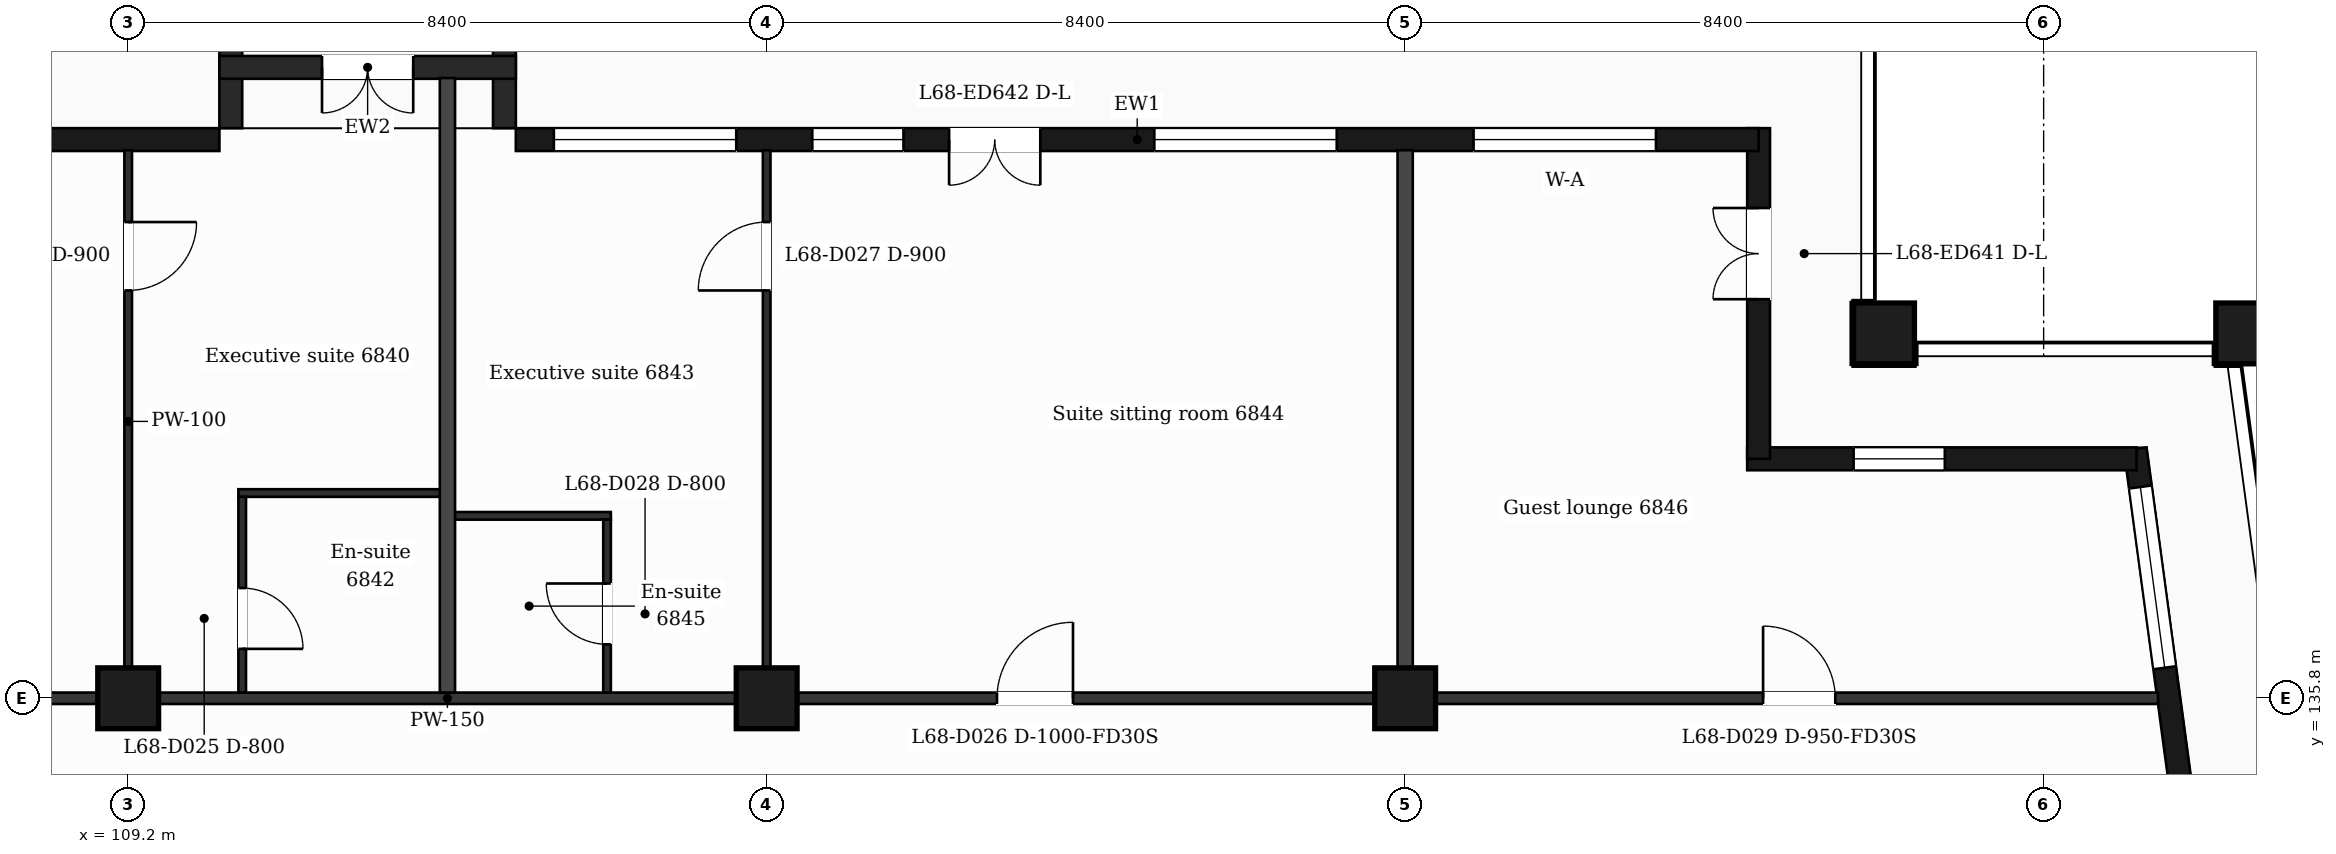
"""IFC4 building model, lengths in metres.
Left out: names, types, materials, properties, quantities, classifications, styles, units other than length and angle.
Written with IfcOpenShell. Run it as: python <this file> out.ifc"""

import sys

from ifc_helpers import new_model, si_unit, direction, frame, frame_2d, origin, origin_2d, place, context, subcontext, project, spatial, rectangle, extrude, element, fill, save


model = new_model("IFC4")
c1 = context("Model", 3, precision=1e-05, world=origin(), true_north=direction((0.0, 1.0)))
c2 = subcontext(c1, "Body", "Model", "MODEL_VIEW")
j1 = project(units=[si_unit("LENGTHUNIT", "METRE"), si_unit("PLANEANGLEUNIT", "RADIAN")], contexts=[c1])
p1 = place(None, origin())
s1 = spatial("IfcSite", under=j1, at=p1, CompositionType="ELEMENT")
p2 = place(p1, origin())
s2 = spatial("IfcBuilding", under=s1, at=p2, CompositionType="ELEMENT")
p3 = place(p2, frame((0.0, 0.0, 281.2)))
s3 = spatial("IfcBuildingStorey", under=s2, at=p3, CompositionType="ELEMENT", Elevation=281.2)
for number, where, z_axis, x_axis in (
    (1, (132.3, 140.6, 0.0), (0.0, 0.0, 1.0), (1.0, 0.0, 0.0)),
    (2, (137.065, 140.6, 0.0), (0.0, 0.0, 1.0), (1.0, 0.0, 0.0)),
    (3, (109.2, 135.8, 0.0), (0.0, 0.0, 1.0), (1.0, 0.0, 0.0)),
    (4, (117.6, 135.8, 0.0), (0.0, 0.0, 1.0), (1.0, 0.0, 0.0)),
    (5, (126.0, 135.8, 0.0), (0.0, 0.0, 1.0), (1.0, 0.0, 0.0)),
):
    element("IfcColumn", number, at=place(p3, frame(where, z_axis=z_axis, x_axis=x_axis)), inside=s3, PredefinedType="COLUMN", context=c2, shape_type="SweptSolid", body=[
        extrude(rectangle(XDim=0.8, YDim=0.8, at=origin_2d()), origin(), (0.0, 0.0, 1.0), 3.7),
    ])
p4 = place(p3, frame((136.504, 132.4, 0.0), z_axis=(0.0, 0.0, 1.0), x_axis=(-0.133399697462, 0.99106231929, 0.0)))
e6 = element("IfcWall", 6, at=p4, inside=s3, PredefinedType="SOLIDWALL", context=c2, shape_type="SweptSolid", body=[
    extrude(rectangle(XDim=6.74, YDim=0.3, at=frame_2d((3.37, 0.0))), origin(), (0.0, 0.0, 1.0), 3.38),
])
p5 = place(p4, frame((1.115, 0.0, 0.0)))
e7 = element("IfcOpeningElement", 7, at=p5, cuts=e6, PredefinedType="OPENING", context=c2, shape_type="SweptSolid", body=[
    extrude(rectangle(XDim=1.2, YDim=2.4, at=frame_2d((0.6, 1.2))), frame((0.0, 0.16, 0.0), z_axis=(0.0, -1.0, 0.0), x_axis=(1.0, 0.0, 0.0)), (0.0, 0.0, 1.0), 0.32),
])
p6 = place(p4, frame((3.835, 0.0, 0.9)))
e8 = element("IfcOpeningElement", 8, at=p6, cuts=e6, PredefinedType="OPENING", context=c2, shape_type="SweptSolid", body=[
    extrude(rectangle(XDim=2.4, YDim=2.1, at=frame_2d((1.2, 1.05))), frame((0.0, 0.16, 0.0), z_axis=(0.0, -1.0, 0.0), x_axis=(1.0, 0.0, 0.0)), (0.0, 0.0, 1.0), 0.32),
])
p7 = place(p3, frame((135.623, 138.95, 0.0), z_axis=(0.0, 0.0, 1.0), x_axis=(-1.0, 0.0, 0.0)))
e9 = element("IfcWall", 9, at=p7, inside=s3, PredefinedType="SOLIDWALL", context=c2, shape_type="SweptSolid", body=[
    extrude(rectangle(XDim=5.123, YDim=0.3, at=frame_2d((2.561, 0.0))), origin(), (0.0, 0.0, 1.0), 3.38),
])
p8 = place(p7, frame((2.523, 0.0, 0.9)))
e10 = element("IfcOpeningElement", 10, at=p8, cuts=e9, PredefinedType="OPENING", context=c2, shape_type="SweptSolid", body=[
    extrude(rectangle(XDim=1.2, YDim=2.1, at=frame_2d((0.6, 1.05))), frame((0.0, 0.16, 0.0), z_axis=(0.0, -1.0, 0.0), x_axis=(1.0, 0.0, 0.0)), (0.0, 0.0, 1.0), 0.32),
])
p9 = place(p3, frame((130.65, 138.95, 0.0), z_axis=(0.0, 0.0, 1.0), x_axis=(0.0, 1.0, 0.0)))
e11 = element("IfcWall", 11, at=p9, inside=s3, PredefinedType="SOLIDWALL", context=c2, shape_type="SweptSolid", body=[
    extrude(rectangle(XDim=4.35, YDim=0.3, at=frame_2d((2.175, 0.0))), origin(), (0.0, 0.0, 1.0), 3.38),
])
p10 = place(p9, frame((2.1, 0.0, 0.0)))
e12 = element("IfcOpeningElement", 12, at=p10, cuts=e11, PredefinedType="OPENING", context=c2, shape_type="SweptSolid", body=[
    extrude(rectangle(XDim=1.2, YDim=2.4, at=frame_2d((0.6, 1.2))), frame((0.0, 0.16, 0.0), z_axis=(0.0, -1.0, 0.0), x_axis=(1.0, 0.0, 0.0)), (0.0, 0.0, 1.0), 0.32),
])
p11 = place(p3, frame((130.65, 143.15, 0.0), z_axis=(0.0, 0.0, 1.0), x_axis=(-1.0, 0.0, 0.0)))
e13 = element("IfcWall", 13, at=p11, inside=s3, PredefinedType="SOLIDWALL", context=c2, shape_type="SweptSolid", body=[
    extrude(rectangle(XDim=16.35, YDim=0.3, at=frame_2d((8.175, 0.0))), origin(), (0.0, 0.0, 1.0), 3.38),
])
p12 = place(p11, frame((1.35, 0.0, 0.9)))
e14 = element("IfcOpeningElement", 14, at=p12, cuts=e13, PredefinedType="OPENING", context=c2, shape_type="SweptSolid", body=[
    extrude(rectangle(XDim=2.4, YDim=2.1, at=frame_2d((1.2, 1.05))), frame((0.0, 0.16, 0.0), z_axis=(0.0, -1.0, 0.0), x_axis=(1.0, 0.0, 0.0)), (0.0, 0.0, 1.0), 0.32),
])
p13 = place(p11, frame((5.55, 0.0, 0.9)))
e15 = element("IfcOpeningElement", 15, at=p13, cuts=e13, PredefinedType="OPENING", context=c2, shape_type="SweptSolid", body=[
    extrude(rectangle(XDim=2.4, YDim=2.1, at=frame_2d((1.2, 1.05))), frame((0.0, 0.16, 0.0), z_axis=(0.0, -1.0, 0.0), x_axis=(1.0, 0.0, 0.0)), (0.0, 0.0, 1.0), 0.32),
])
p14 = place(p11, frame((9.45, 0.0, 0.0)))
e16 = element("IfcOpeningElement", 16, at=p14, cuts=e13, PredefinedType="OPENING", context=c2, shape_type="SweptSolid", body=[
    extrude(rectangle(XDim=1.2, YDim=2.4, at=frame_2d((0.6, 1.2))), frame((0.0, 0.16, 0.0), z_axis=(0.0, -1.0, 0.0), x_axis=(1.0, 0.0, 0.0)), (0.0, 0.0, 1.0), 0.32),
])
p15 = place(p11, frame((11.25, 0.0, 0.9)))
e17 = element("IfcOpeningElement", 17, at=p15, cuts=e13, PredefinedType="OPENING", context=c2, shape_type="SweptSolid", body=[
    extrude(rectangle(XDim=1.2, YDim=2.1, at=frame_2d((0.6, 1.05))), frame((0.0, 0.16, 0.0), z_axis=(0.0, -1.0, 0.0), x_axis=(1.0, 0.0, 0.0)), (0.0, 0.0, 1.0), 0.32),
])
p16 = place(p11, frame((13.45, 0.0, 0.9)))
e18 = element("IfcOpeningElement", 18, at=p16, cuts=e13, PredefinedType="OPENING", context=c2, shape_type="SweptSolid", body=[
    extrude(rectangle(XDim=2.4, YDim=2.1, at=frame_2d((1.2, 1.05))), frame((0.0, 0.16, 0.0), z_axis=(0.0, -1.0, 0.0), x_axis=(1.0, 0.0, 0.0)), (0.0, 0.0, 1.0), 0.32),
])
p17 = place(p3, frame((110.4, 143.15, 0.0), z_axis=(0.0, 0.0, 1.0), x_axis=(-1.0, 0.0, 0.0)))
e19 = element("IfcWall", 19, at=p17, inside=s3, PredefinedType="SOLIDWALL", context=c2, shape_type="SweptSolid", body=[
    extrude(rectangle(XDim=14.4, YDim=0.3, at=frame_2d((7.2, 0.0))), origin(), (0.0, 0.0, 1.0), 3.38),
])
p18 = place(p17, frame((2.7, 0.0, 0.9)))
e20 = element("IfcOpeningElement", 20, at=p18, cuts=e19, PredefinedType="OPENING", context=c2, shape_type="SweptSolid", body=[
    extrude(rectangle(XDim=1.2, YDim=2.1, at=frame_2d((0.6, 1.05))), frame((0.0, 0.16, 0.0), z_axis=(0.0, -1.0, 0.0), x_axis=(1.0, 0.0, 0.0)), (0.0, 0.0, 1.0), 0.32),
])
p19 = place(p17, frame((6.9, 0.0, 0.0)))
e21 = element("IfcOpeningElement", 21, at=p19, cuts=e19, PredefinedType="OPENING", context=c2, shape_type="SweptSolid", body=[
    extrude(rectangle(XDim=1.2, YDim=2.4, at=frame_2d((0.6, 1.2))), frame((0.0, 0.16, 0.0), z_axis=(0.0, -1.0, 0.0), x_axis=(1.0, 0.0, 0.0)), (0.0, 0.0, 1.0), 0.32),
])
p20 = place(p17, frame((10.5, 0.0, 0.9)))
e22 = element("IfcOpeningElement", 22, at=p20, cuts=e19, PredefinedType="OPENING", context=c2, shape_type="SweptSolid", body=[
    extrude(rectangle(XDim=2.4, YDim=2.1, at=frame_2d((1.2, 1.05))), frame((0.0, 0.16, 0.0), z_axis=(0.0, -1.0, 0.0), x_axis=(1.0, 0.0, 0.0)), (0.0, 0.0, 1.0), 0.32),
])
for number, where, z_axis, x_axis in (
    (23, (114.15, 143.3, 0.0), (0.0, 0.0, 1.0), (0.0, 1.0, 0.0)),
    (24, (110.55, 143.3, 0.0), (0.0, 0.0, 1.0), (0.0, 1.0, 0.0)),
):
    element("IfcWall", number, at=place(p3, frame(where, z_axis=z_axis, x_axis=x_axis)), inside=s3, PredefinedType="SOLIDWALL", context=c2, shape_type="SweptSolid", body=[
        extrude(rectangle(XDim=1.35, YDim=0.3, at=frame_2d((0.675, 0.0))), origin(), (0.0, 0.0, 1.0), 3.38),
    ])
p21 = place(p3, frame((114.3, 144.1, 0.0), z_axis=(0.0, 0.0, 1.0), x_axis=(-1.0, 0.0, 0.0)))
e25 = element("IfcWall", 25, at=p21, inside=s3, PredefinedType="SOLIDWALL", context=c2, shape_type="SweptSolid", body=[
    extrude(rectangle(XDim=3.9, YDim=0.3, at=frame_2d((1.95, 0.0))), origin(), (0.0, 0.0, 1.0), 3.38),
])
p22 = place(p21, frame((1.35, 0.0, 0.0)))
e26 = element("IfcOpeningElement", 26, at=p22, cuts=e25, PredefinedType="OPENING", context=c2, shape_type="SweptSolid", body=[
    extrude(rectangle(XDim=1.2, YDim=2.4, at=frame_2d((0.6, 1.2))), frame((0.0, 0.16, 0.0), z_axis=(0.0, -1.0, 0.0), x_axis=(1.0, 0.0, 0.0)), (0.0, 0.0, 1.0), 0.32),
])
p23 = place(p3, frame((90.895, 135.8, 0.0), z_axis=(0.0, 0.0, 1.0), x_axis=(1.0, 0.0, 0.0)))
e27 = element("IfcWall", 27, at=p23, inside=s3, PredefinedType="PARTITIONING", context=c2, shape_type="SweptSolid", body=[
    extrude(rectangle(XDim=45.011, YDim=0.15, at=frame_2d((22.505, 0.0))), origin(), (0.0, 0.0, 1.0), 3.38),
])
p24 = place(p23, frame((8.005, 0.0, 0.0)))
e28 = element("IfcOpeningElement", 28, at=p24, cuts=e27, PredefinedType="OPENING", context=c2, shape_type="SweptSolid", body=[
    extrude(rectangle(XDim=1.0, YDim=2.1, at=frame_2d((0.5, 1.05))), frame((0.0, 0.085, 0.0), z_axis=(0.0, -1.0, 0.0), x_axis=(1.0, 0.0, 0.0)), (0.0, 0.0, 1.0), 0.17),
])
p25 = place(p23, frame((13.605, 0.0, 0.0)))
e29 = element("IfcOpeningElement", 29, at=p25, cuts=e27, PredefinedType="OPENING", context=c2, shape_type="SweptSolid", body=[
    extrude(rectangle(XDim=1.0, YDim=2.1, at=frame_2d((0.5, 1.05))), frame((0.0, 0.085, 0.0), z_axis=(0.0, -1.0, 0.0), x_axis=(1.0, 0.0, 0.0)), (0.0, 0.0, 1.0), 0.17),
])
p26 = place(p23, frame((29.735, 0.0, 0.0)))
e30 = element("IfcOpeningElement", 30, at=p26, cuts=e27, PredefinedType="OPENING", context=c2, shape_type="SweptSolid", body=[
    extrude(rectangle(XDim=1.0, YDim=2.1, at=frame_2d((0.5, 1.05))), frame((0.0, 0.085, 0.0), z_axis=(0.0, -1.0, 0.0), x_axis=(1.0, 0.0, 0.0)), (0.0, 0.0, 1.0), 0.17),
])
p27 = place(p23, frame((39.814, 0.0, 0.0)))
e31 = element("IfcOpeningElement", 31, at=p27, cuts=e27, PredefinedType="OPENING", context=c2, shape_type="SweptSolid", body=[
    extrude(rectangle(XDim=0.95, YDim=2.1, at=frame_2d((0.475, 1.05))), frame((0.0, 0.085, 0.0), z_axis=(0.0, -1.0, 0.0), x_axis=(1.0, 0.0, 0.0)), (0.0, 0.0, 1.0), 0.17),
])
p28 = place(p3, frame((113.4, 138.2, 0.0), z_axis=(0.0, 0.0, 1.0), x_axis=(1.0, 0.0, 0.0)))
e32 = element("IfcWall", 32, at=p28, inside=s3, PredefinedType="PARTITIONING", context=c2, shape_type="SweptSolid", body=[
    extrude(rectangle(XDim=2.15, YDim=0.1, at=frame_2d((1.075, 0.0))), origin(), (0.0, 0.0, 1.0), 3.38),
])
p29 = place(p3, frame((110.65, 138.5, 0.0), z_axis=(0.0, 0.0, 1.0), x_axis=(1.0, 0.0, 0.0)))
e33 = element("IfcWall", 33, at=p29, inside=s3, PredefinedType="PARTITIONING", context=c2, shape_type="SweptSolid", body=[
    extrude(rectangle(XDim=2.75, YDim=0.1, at=frame_2d((1.375, 0.0))), origin(), (0.0, 0.0, 1.0), 3.38),
])
p30 = place(p3, frame((109.2, 135.875, 0.0), z_axis=(0.0, 0.0, 1.0), x_axis=(0.0, 1.0, 0.0)))
e34 = element("IfcWall", 34, at=p30, inside=s3, PredefinedType="PARTITIONING", context=c2, shape_type="SweptSolid", body=[
    extrude(rectangle(XDim=7.135, YDim=0.1, at=frame_2d((3.567, 0.0))), origin(), (0.0, 0.0, 1.0), 3.38),
])
p31 = place(p30, frame((5.29, 0.0, 0.0)))
e35 = element("IfcOpeningElement", 35, at=p31, cuts=e34, PredefinedType="OPENING", context=c2, shape_type="SweptSolid", body=[
    extrude(rectangle(XDim=0.9, YDim=2.1, at=frame_2d((0.45, 1.05))), frame((0.0, 0.06, 0.0), z_axis=(0.0, -1.0, 0.0), x_axis=(1.0, 0.0, 0.0)), (0.0, 0.0, 1.0), 0.12),
])
p32 = place(p3, frame((110.7, 135.875, 0.0), z_axis=(0.0, 0.0, 1.0), x_axis=(0.0, 1.0, 0.0)))
e36 = element("IfcWall", 36, at=p32, inside=s3, PredefinedType="PARTITIONING", context=c2, shape_type="SweptSolid", body=[
    extrude(rectangle(XDim=2.575, YDim=0.1, at=frame_2d((1.288, 0.0))), origin(), (0.0, 0.0, 1.0), 3.38),
])
p33 = place(p32, frame((0.575, 0.0, 0.0)))
e37 = element("IfcOpeningElement", 37, at=p33, cuts=e36, PredefinedType="OPENING", context=c2, shape_type="SweptSolid", body=[
    extrude(rectangle(XDim=0.8, YDim=2.1, at=frame_2d((0.4, 1.05))), frame((0.0, 0.06, 0.0), z_axis=(0.0, -1.0, 0.0), x_axis=(1.0, 0.0, 0.0)), (0.0, 0.0, 1.0), 0.12),
])
p34 = place(p3, frame((113.4, 135.875, 0.0), z_axis=(0.0, 0.0, 1.0), x_axis=(0.0, 1.0, 0.0)))
e38 = element("IfcWall", 38, at=p34, inside=s3, PredefinedType="PARTITIONING", context=c2, shape_type="SweptSolid", body=[
    extrude(rectangle(XDim=8.085, YDim=0.2, at=frame_2d((4.042, 0.0))), origin(), (0.0, 0.0, 1.0), 3.38),
])
p35 = place(p3, frame((115.5, 135.875, 0.0), z_axis=(0.0, 0.0, 1.0), x_axis=(0.0, 1.0, 0.0)))
e39 = element("IfcWall", 39, at=p35, inside=s3, PredefinedType="PARTITIONING", context=c2, shape_type="SweptSolid", body=[
    extrude(rectangle(XDim=2.275, YDim=0.1, at=frame_2d((1.137, 0.0))), origin(), (0.0, 0.0, 1.0), 3.38),
])
p36 = place(p35, frame((0.635, 0.0, 0.0)))
e40 = element("IfcOpeningElement", 40, at=p36, cuts=e39, PredefinedType="OPENING", context=c2, shape_type="SweptSolid", body=[
    extrude(rectangle(XDim=0.8, YDim=2.1, at=frame_2d((0.4, 1.05))), frame((0.0, 0.06, 0.0), z_axis=(0.0, -1.0, 0.0), x_axis=(1.0, 0.0, 0.0)), (0.0, 0.0, 1.0), 0.12),
])
p37 = place(p3, frame((117.6, 135.875, 0.0), z_axis=(0.0, 0.0, 1.0), x_axis=(0.0, 1.0, 0.0)))
e41 = element("IfcWall", 41, at=p37, inside=s3, PredefinedType="PARTITIONING", context=c2, shape_type="SweptSolid", body=[
    extrude(rectangle(XDim=7.135, YDim=0.1, at=frame_2d((3.567, 0.0))), origin(), (0.0, 0.0, 1.0), 3.38),
])
p38 = place(p37, frame((5.29, 0.0, 0.0)))
e42 = element("IfcOpeningElement", 42, at=p38, cuts=e41, PredefinedType="OPENING", context=c2, shape_type="SweptSolid", body=[
    extrude(rectangle(XDim=0.9, YDim=2.1, at=frame_2d((0.45, 1.05))), frame((0.0, 0.06, 0.0), z_axis=(0.0, -1.0, 0.0), x_axis=(1.0, 0.0, 0.0)), (0.0, 0.0, 1.0), 0.12),
])
p39 = place(p3, frame((126.0, 135.875, 0.0), z_axis=(0.0, 0.0, 1.0), x_axis=(0.0, 1.0, 0.0)))
e43 = element("IfcWall", 43, at=p39, inside=s3, PredefinedType="PARTITIONING", context=c2, shape_type="SweptSolid", body=[
    extrude(rectangle(XDim=7.135, YDim=0.2, at=frame_2d((3.567, 0.0))), origin(), (0.0, 0.0, 1.0), 3.38),
])
p40 = place(p6, origin())
e44 = element("IfcWindow", 44, at=p40, inside=s3, PartitioningType="SINGLE_PANEL", PredefinedType="WINDOW", context=c2, shape_type="SweptSolid", body=[
    extrude(rectangle(XDim=2.4, YDim=2.1, at=frame_2d((1.2, 1.05))), frame((0.0, 0.03, 0.0), z_axis=(0.0, -1.0, 0.0), x_axis=(1.0, 0.0, 0.0)), (0.0, 0.0, 1.0), 0.06),
])
fill(e8, e44)
p41 = place(p8, origin())
e45 = element("IfcWindow", 45, at=p41, inside=s3, PartitioningType="SINGLE_PANEL", PredefinedType="WINDOW", context=c2, shape_type="SweptSolid", body=[
    extrude(rectangle(XDim=1.2, YDim=2.1, at=frame_2d((0.6, 1.05))), frame((0.0, 0.03, 0.0), z_axis=(0.0, -1.0, 0.0), x_axis=(1.0, 0.0, 0.0)), (0.0, 0.0, 1.0), 0.06),
])
fill(e10, e45)
p42 = place(p10, origin())
e46 = element("IfcDoor", 46, at=p42, inside=s3, OperationType="DOUBLE_DOOR_SINGLE_SWING", PredefinedType="DOOR", context=c2, shape_type="SweptSolid", body=[
    extrude(rectangle(XDim=1.2, YDim=2.4, at=frame_2d((0.6, 1.2))), frame((0.0, 0.025, 0.0), z_axis=(0.0, -1.0, 0.0), x_axis=(1.0, 0.0, 0.0)), (0.0, 0.0, 1.0), 0.05),
])
fill(e12, e46)
p43 = place(p12, origin())
e47 = element("IfcWindow", 47, at=p43, inside=s3, PartitioningType="SINGLE_PANEL", PredefinedType="WINDOW", context=c2, shape_type="SweptSolid", body=[
    extrude(rectangle(XDim=2.4, YDim=2.1, at=frame_2d((1.2, 1.05))), frame((0.0, 0.03, 0.0), z_axis=(0.0, -1.0, 0.0), x_axis=(1.0, 0.0, 0.0)), (0.0, 0.0, 1.0), 0.06),
])
fill(e14, e47)
p44 = place(p13, origin())
e48 = element("IfcWindow", 48, at=p44, inside=s3, PartitioningType="SINGLE_PANEL", PredefinedType="WINDOW", context=c2, shape_type="SweptSolid", body=[
    extrude(rectangle(XDim=2.4, YDim=2.1, at=frame_2d((1.2, 1.05))), frame((0.0, 0.03, 0.0), z_axis=(0.0, -1.0, 0.0), x_axis=(1.0, 0.0, 0.0)), (0.0, 0.0, 1.0), 0.06),
])
fill(e15, e48)
p45 = place(p14, origin())
e49 = element("IfcDoor", 49, at=p45, inside=s3, OperationType="DOUBLE_DOOR_SINGLE_SWING", PredefinedType="DOOR", context=c2, shape_type="SweptSolid", body=[
    extrude(rectangle(XDim=1.2, YDim=2.4, at=frame_2d((0.6, 1.2))), frame((0.0, 0.025, 0.0), z_axis=(0.0, -1.0, 0.0), x_axis=(1.0, 0.0, 0.0)), (0.0, 0.0, 1.0), 0.05),
])
fill(e16, e49)
p46 = place(p15, origin())
e50 = element("IfcWindow", 50, at=p46, inside=s3, PartitioningType="SINGLE_PANEL", PredefinedType="WINDOW", context=c2, shape_type="SweptSolid", body=[
    extrude(rectangle(XDim=1.2, YDim=2.1, at=frame_2d((0.6, 1.05))), frame((0.0, 0.03, 0.0), z_axis=(0.0, -1.0, 0.0), x_axis=(1.0, 0.0, 0.0)), (0.0, 0.0, 1.0), 0.06),
])
fill(e17, e50)
p47 = place(p16, origin())
e51 = element("IfcWindow", 51, at=p47, inside=s3, PartitioningType="SINGLE_PANEL", PredefinedType="WINDOW", context=c2, shape_type="SweptSolid", body=[
    extrude(rectangle(XDim=2.4, YDim=2.1, at=frame_2d((1.2, 1.05))), frame((0.0, 0.03, 0.0), z_axis=(0.0, -1.0, 0.0), x_axis=(1.0, 0.0, 0.0)), (0.0, 0.0, 1.0), 0.06),
])
fill(e18, e51)
p48 = place(p22, origin())
e52 = element("IfcDoor", 52, at=p48, inside=s3, OperationType="DOUBLE_DOOR_SINGLE_SWING", PredefinedType="DOOR", context=c2, shape_type="SweptSolid", body=[
    extrude(rectangle(XDim=1.2, YDim=2.4, at=frame_2d((0.6, 1.2))), frame((0.0, 0.025, 0.0), z_axis=(0.0, -1.0, 0.0), x_axis=(1.0, 0.0, 0.0)), (0.0, 0.0, 1.0), 0.05),
])
fill(e26, e52)
p49 = place(p31, origin())
e53 = element("IfcDoor", 53, at=p49, inside=s3, OperationType="SINGLE_SWING_RIGHT", PredefinedType="DOOR", context=c2, shape_type="SweptSolid", body=[
    extrude(rectangle(XDim=0.9, YDim=2.1, at=frame_2d((0.45, 1.05))), frame((0.0, 0.025, 0.0), z_axis=(0.0, -1.0, 0.0), x_axis=(1.0, 0.0, 0.0)), (0.0, 0.0, 1.0), 0.05),
])
fill(e35, e53)
p50 = place(p33, origin())
e54 = element("IfcDoor", 54, at=p50, inside=s3, OperationType="SINGLE_SWING_LEFT", PredefinedType="DOOR", context=c2, shape_type="SweptSolid", body=[
    extrude(rectangle(XDim=0.8, YDim=2.1, at=frame_2d((0.4, 1.05))), frame((0.0, 0.025, 0.0), z_axis=(0.0, -1.0, 0.0), x_axis=(1.0, 0.0, 0.0)), (0.0, 0.0, 1.0), 0.05),
])
fill(e37, e54)
p51 = place(p26, origin())
e55 = element("IfcDoor", 55, at=p51, inside=s3, OperationType="SINGLE_SWING_RIGHT", PredefinedType="DOOR", context=c2, shape_type="SweptSolid", body=[
    extrude(rectangle(XDim=1.0, YDim=2.1, at=frame_2d((0.5, 1.05))), frame((0.0, 0.025, 0.0), z_axis=(0.0, -1.0, 0.0), x_axis=(1.0, 0.0, 0.0)), (0.0, 0.0, 1.0), 0.05),
])
fill(e30, e55)
p52 = place(p38, origin())
e56 = element("IfcDoor", 56, at=p52, inside=s3, OperationType="SINGLE_SWING_LEFT", PredefinedType="DOOR", context=c2, shape_type="SweptSolid", body=[
    extrude(rectangle(XDim=0.9, YDim=2.1, at=frame_2d((0.45, 1.05))), frame((0.0, 0.025, 0.0), z_axis=(0.0, -1.0, 0.0), x_axis=(1.0, 0.0, 0.0)), (0.0, 0.0, 1.0), 0.05),
])
fill(e42, e56)
p53 = place(p36, origin())
e57 = element("IfcDoor", 57, at=p53, inside=s3, OperationType="SINGLE_SWING_RIGHT", PredefinedType="DOOR", context=c2, shape_type="SweptSolid", body=[
    extrude(rectangle(XDim=0.8, YDim=2.1, at=frame_2d((0.4, 1.05))), frame((0.0, 0.025, 0.0), z_axis=(0.0, -1.0, 0.0), x_axis=(1.0, 0.0, 0.0)), (0.0, 0.0, 1.0), 0.05),
])
fill(e40, e57)
p54 = place(p27, origin())
e58 = element("IfcDoor", 58, at=p54, inside=s3, OperationType="SINGLE_SWING_LEFT", PredefinedType="DOOR", context=c2, shape_type="SweptSolid", body=[
    extrude(rectangle(XDim=0.95, YDim=2.1, at=frame_2d((0.475, 1.05))), frame((0.0, 0.025, 0.0), z_axis=(0.0, -1.0, 0.0), x_axis=(1.0, 0.0, 0.0)), (0.0, 0.0, 1.0), 0.05),
])
fill(e31, e58)
save(model, sys.argv[1])
